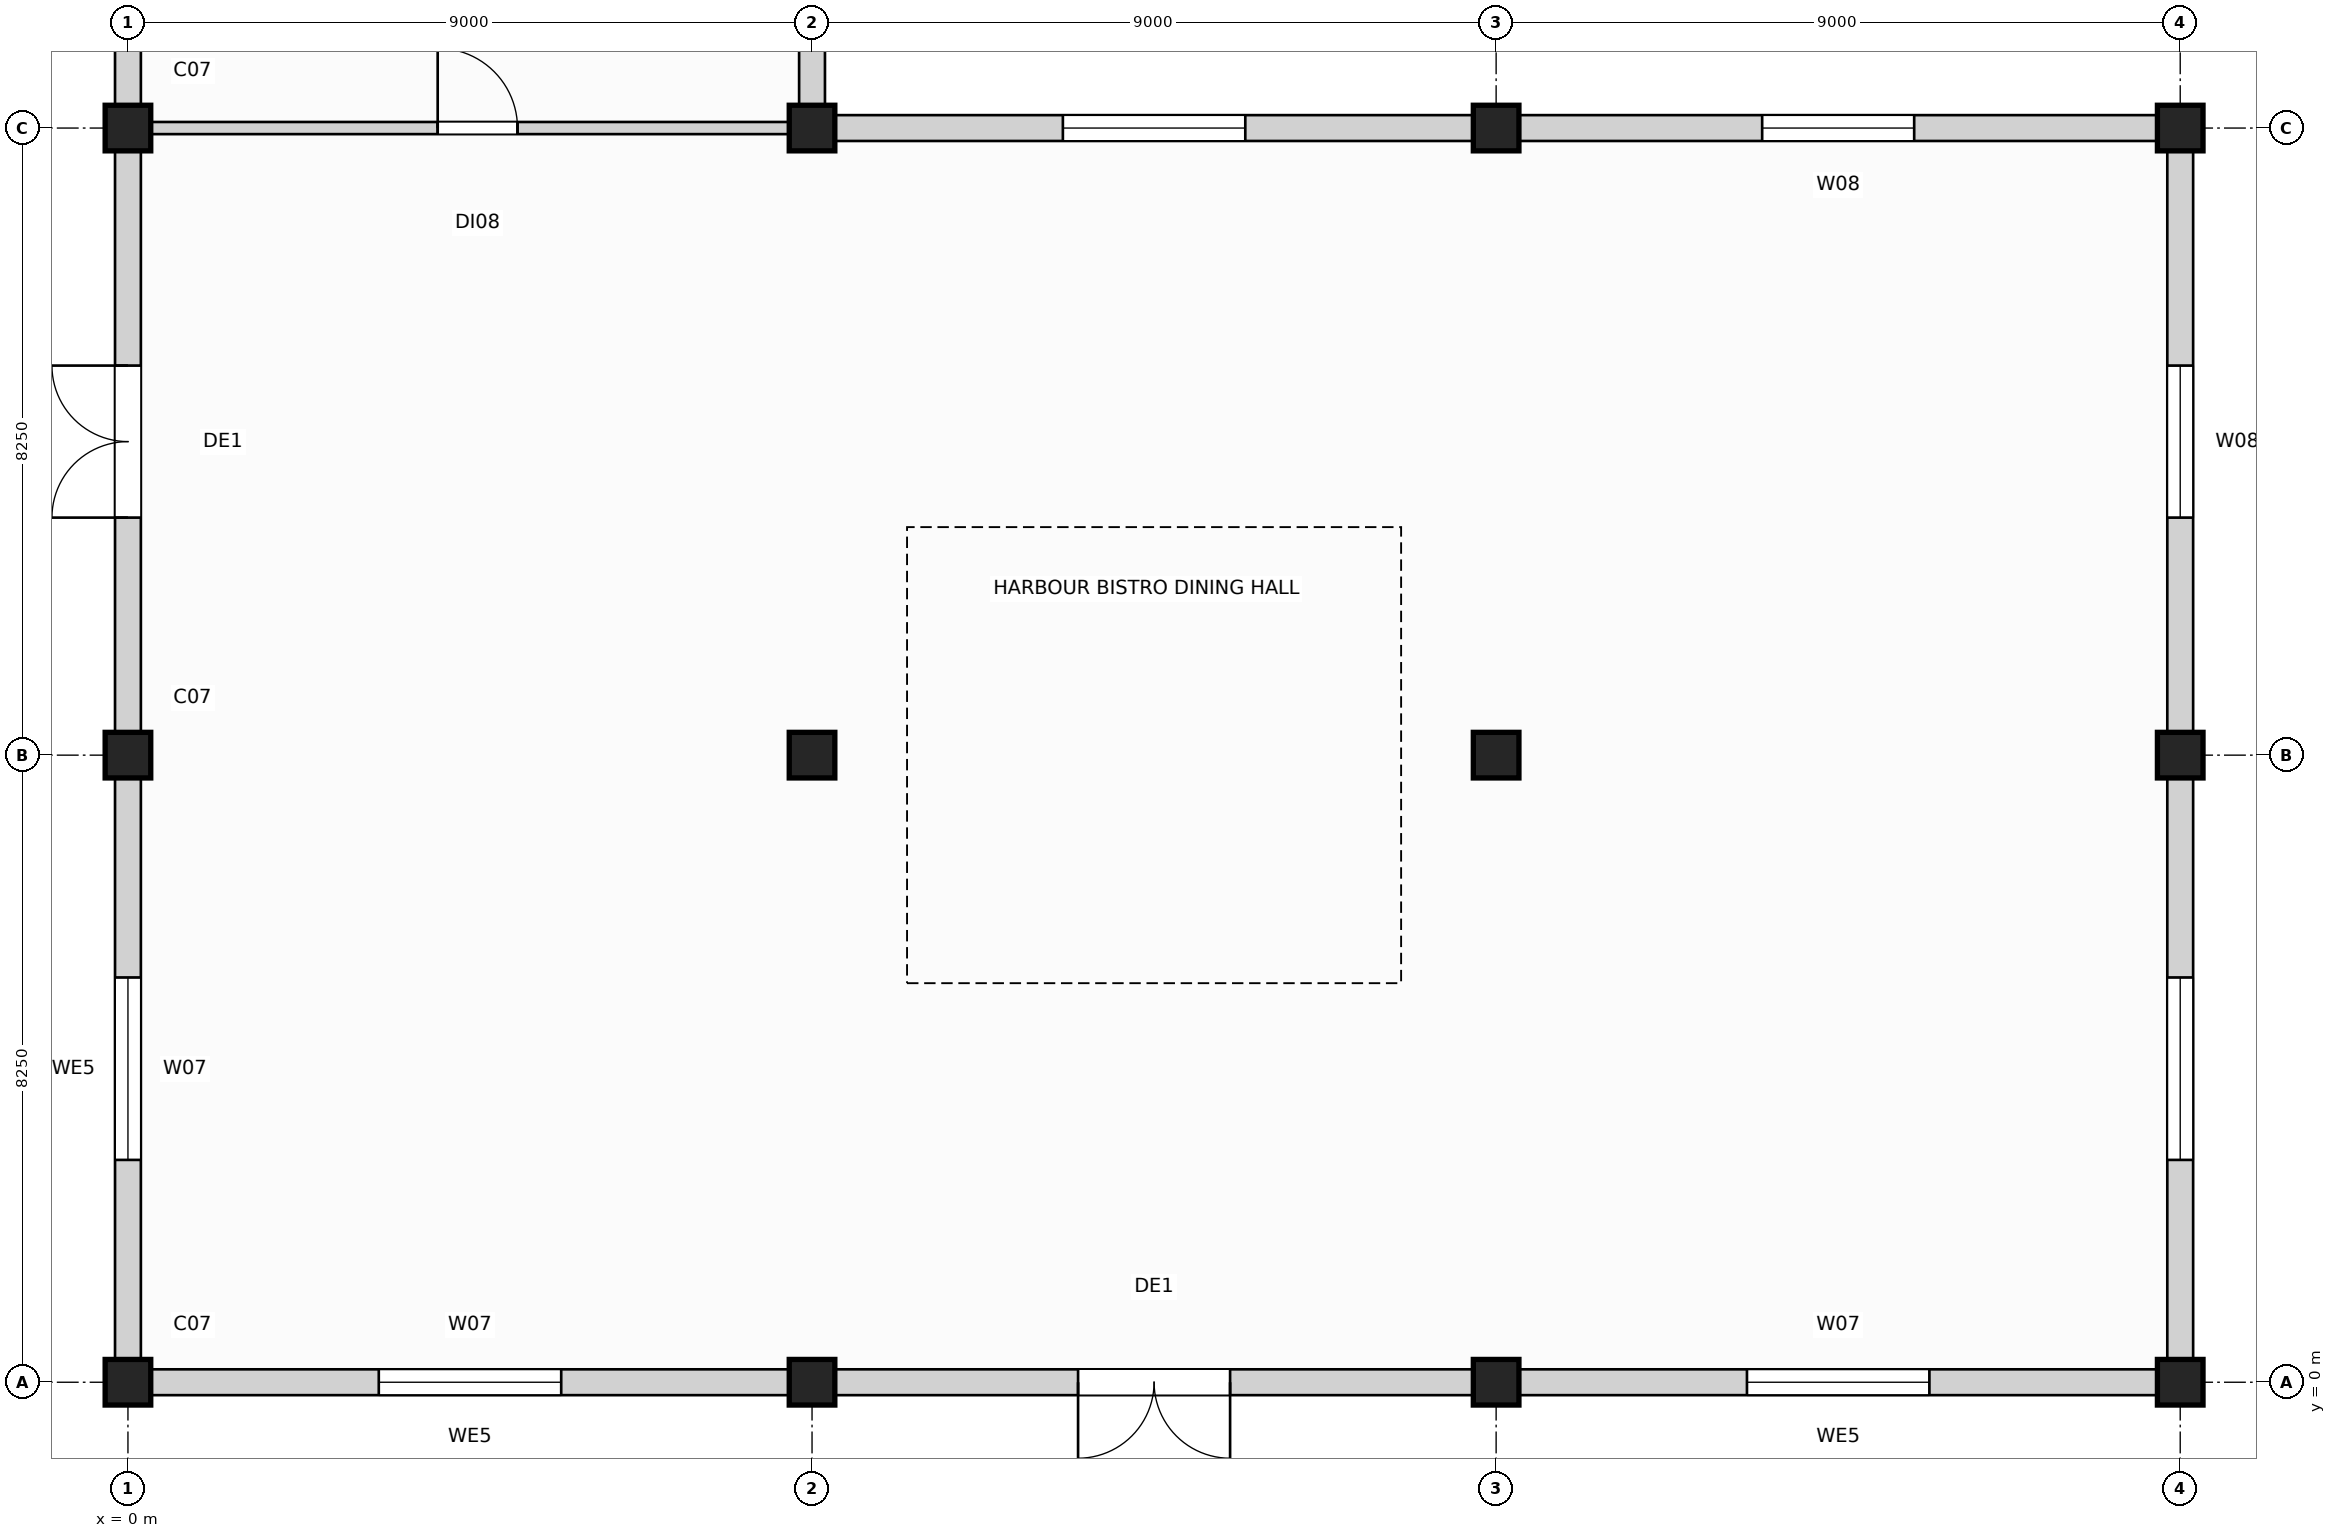
"""IFC4 building model, lengths in metres.
Left out: names, types, materials, properties, quantities, classifications, styles, units other than length and angle.
Written with IfcOpenShell. Run it as: python <this file> out.ifc"""

import sys

from ifc_helpers import new_model, si_unit, direction, frame, frame_2d, origin, origin_2d, place, context, subcontext, project, spatial, rectangle, extrude, element, fill, save


model = new_model("IFC4")
c1 = context("Model", 3, precision=1e-05, world=origin(), true_north=direction((0.0, 1.0)))
c2 = subcontext(c1, "Body", "Model", "MODEL_VIEW")
j1 = project(units=[si_unit("LENGTHUNIT", "METRE"), si_unit("PLANEANGLEUNIT", "RADIAN")], contexts=[c1])
p1 = place(None, origin())
s1 = spatial("IfcSite", under=j1, at=p1, CompositionType="ELEMENT")
p2 = place(p1, origin())
s2 = spatial("IfcBuilding", under=s1, at=p2, CompositionType="ELEMENT")
p3 = place(p2, origin())
s3 = spatial("IfcBuildingStorey", under=s2, at=p3, CompositionType="ELEMENT", Elevation=0.0)
for number, where, z_axis, x_axis in (
    (1, (0.0, 0.0, 0.0), (0.0, 0.0, 1.0), (1.0, 0.0, 0.0)),
    (2, (0.0, 8.25, 0.0), (0.0, 0.0, 1.0), (1.0, 0.0, 0.0)),
    (3, (0.0, 16.5, 0.0), (0.0, 0.0, 1.0), (1.0, 0.0, 0.0)),
    (4, (9.0, 0.0, 0.0), (0.0, 0.0, 1.0), (1.0, 0.0, 0.0)),
    (5, (9.0, 8.25, 0.0), (0.0, 0.0, 1.0), (1.0, 0.0, 0.0)),
    (6, (9.0, 16.5, 0.0), (0.0, 0.0, 1.0), (1.0, 0.0, 0.0)),
    (7, (18.0, 0.0, 0.0), (0.0, 0.0, 1.0), (1.0, 0.0, 0.0)),
    (8, (18.0, 8.25, 0.0), (0.0, 0.0, 1.0), (1.0, 0.0, 0.0)),
    (9, (18.0, 16.5, 0.0), (0.0, 0.0, 1.0), (1.0, 0.0, 0.0)),
    (10, (27.0, 0.0, 0.0), (0.0, 0.0, 1.0), (1.0, 0.0, 0.0)),
    (11, (27.0, 8.25, 0.0), (0.0, 0.0, 1.0), (1.0, 0.0, 0.0)),
    (12, (27.0, 16.5, 0.0), (0.0, 0.0, 1.0), (1.0, 0.0, 0.0)),
):
    element("IfcColumn", number, at=place(p3, frame(where, z_axis=z_axis, x_axis=x_axis)), inside=s3, PredefinedType="COLUMN", context=c2, shape_type="SweptSolid", body=[
        extrude(rectangle(XDim=0.6, YDim=0.6, at=origin_2d()), origin(), (0.0, 0.0, 1.0), 6.0),
    ])
p4 = place(p3, frame((8.705, 0.0, 0.0), z_axis=(0.0, 0.0, 1.0), x_axis=(-1.0, 0.0, 0.0)))
e13 = element("IfcWall", 13, at=p4, inside=s3, PredefinedType="SOLIDWALL", context=c2, shape_type="SweptSolid", body=[
    extrude(rectangle(XDim=8.41, YDim=0.34, at=frame_2d((4.205, 0.0))), origin(), (0.0, 0.0, 1.0), 4.965),
])
p5 = place(p4, frame((3.005, 0.0, 0.85)))
e14 = element("IfcOpeningElement", 14, at=p5, cuts=e13, PredefinedType="OPENING", context=c2, shape_type="SweptSolid", body=[
    extrude(rectangle(XDim=2.4, YDim=2.7, at=frame_2d((1.2, 1.35))), frame((0.0, 0.18, 0.0), z_axis=(0.0, -1.0, 0.0), x_axis=(1.0, 0.0, 0.0)), (0.0, 0.0, 1.0), 0.36),
])
p6 = place(p3, frame((17.705, 0.0, 0.0), z_axis=(0.0, 0.0, 1.0), x_axis=(-1.0, 0.0, 0.0)))
e15 = element("IfcWall", 15, at=p6, inside=s3, PredefinedType="SOLIDWALL", context=c2, shape_type="SweptSolid", body=[
    extrude(rectangle(XDim=8.41, YDim=0.34, at=frame_2d((4.205, 0.0))), origin(), (0.0, 0.0, 1.0), 4.965),
])
p7 = place(p6, frame((3.205, 0.0, 0.0)))
e16 = element("IfcOpeningElement", 16, at=p7, cuts=e15, PredefinedType="OPENING", context=c2, shape_type="SweptSolid", body=[
    extrude(rectangle(XDim=2.0, YDim=2.4, at=frame_2d((1.0, 1.2))), frame((0.0, 0.18, 0.0), z_axis=(0.0, -1.0, 0.0), x_axis=(1.0, 0.0, 0.0)), (0.0, 0.0, 1.0), 0.36),
])
p8 = place(p3, frame((26.705, 0.0, 0.0), z_axis=(0.0, 0.0, 1.0), x_axis=(-1.0, 0.0, 0.0)))
e17 = element("IfcWall", 17, at=p8, inside=s3, PredefinedType="SOLIDWALL", context=c2, shape_type="SweptSolid", body=[
    extrude(rectangle(XDim=8.41, YDim=0.34, at=frame_2d((4.205, 0.0))), origin(), (0.0, 0.0, 1.0), 4.965),
])
p9 = place(p8, frame((3.005, 0.0, 0.85)))
e18 = element("IfcOpeningElement", 18, at=p9, cuts=e17, PredefinedType="OPENING", context=c2, shape_type="SweptSolid", body=[
    extrude(rectangle(XDim=2.4, YDim=2.7, at=frame_2d((1.2, 1.35))), frame((0.0, 0.18, 0.0), z_axis=(0.0, -1.0, 0.0), x_axis=(1.0, 0.0, 0.0)), (0.0, 0.0, 1.0), 0.36),
])
p10 = place(p3, frame((0.0, 0.295, 0.0), z_axis=(0.0, 0.0, 1.0), x_axis=(0.0, 1.0, 0.0)))
e19 = element("IfcWall", 19, at=p10, inside=s3, PredefinedType="SOLIDWALL", context=c2, shape_type="SweptSolid", body=[
    extrude(rectangle(XDim=7.66, YDim=0.34, at=frame_2d((3.83, 0.0))), origin(), (0.0, 0.0, 1.0), 4.715),
])
p11 = place(p10, frame((2.63, 0.0, 0.85)))
e20 = element("IfcOpeningElement", 20, at=p11, cuts=e19, PredefinedType="OPENING", context=c2, shape_type="SweptSolid", body=[
    extrude(rectangle(XDim=2.4, YDim=2.7, at=frame_2d((1.2, 1.35))), frame((0.0, 0.18, 0.0), z_axis=(0.0, -1.0, 0.0), x_axis=(1.0, 0.0, 0.0)), (0.0, 0.0, 1.0), 0.36),
])
p12 = place(p3, frame((0.0, 8.545, 0.0), z_axis=(0.0, 0.0, 1.0), x_axis=(0.0, 1.0, 0.0)))
e21 = element("IfcWall", 21, at=p12, inside=s3, PredefinedType="SOLIDWALL", context=c2, shape_type="SweptSolid", body=[
    extrude(rectangle(XDim=7.66, YDim=0.34, at=frame_2d((3.83, 0.0))), origin(), (0.0, 0.0, 1.0), 4.715),
])
p13 = place(p12, frame((2.83, 0.0, 0.0)))
e22 = element("IfcOpeningElement", 22, at=p13, cuts=e21, PredefinedType="OPENING", context=c2, shape_type="SweptSolid", body=[
    extrude(rectangle(XDim=2.0, YDim=2.4, at=frame_2d((1.0, 1.2))), frame((0.0, 0.18, 0.0), z_axis=(0.0, -1.0, 0.0), x_axis=(1.0, 0.0, 0.0)), (0.0, 0.0, 1.0), 0.36),
])
p14 = place(p3, frame((0.0, 16.795, 0.0), z_axis=(0.0, 0.0, 1.0), x_axis=(0.0, 1.0, 0.0)))
e23 = element("IfcWall", 23, at=p14, inside=s3, PredefinedType="SOLIDWALL", context=c2, shape_type="SweptSolid", body=[
    extrude(rectangle(XDim=7.66, YDim=0.34, at=frame_2d((3.83, 0.0))), origin(), (0.0, 0.0, 1.0), 4.715),
])
p15 = place(p14, frame((2.63, 0.0, 0.85)))
e24 = element("IfcOpeningElement", 24, at=p15, cuts=e23, PredefinedType="OPENING", context=c2, shape_type="SweptSolid", body=[
    extrude(rectangle(XDim=2.4, YDim=2.7, at=frame_2d((1.2, 1.35))), frame((0.0, 0.18, 0.0), z_axis=(0.0, -1.0, 0.0), x_axis=(1.0, 0.0, 0.0)), (0.0, 0.0, 1.0), 0.36),
])
p16 = place(p3, frame((27.0, 0.295, 0.0), z_axis=(0.0, 0.0, 1.0), x_axis=(0.0, 1.0, 0.0)))
e25 = element("IfcWall", 25, at=p16, inside=s3, PredefinedType="SOLIDWALL", context=c2, shape_type="SweptSolid", body=[
    extrude(rectangle(XDim=7.66, YDim=0.34, at=frame_2d((3.83, 0.0))), origin(), (0.0, 0.0, 1.0), 5.015),
])
p17 = place(p16, frame((2.63, 0.0, 0.85)))
e26 = element("IfcOpeningElement", 26, at=p17, cuts=e25, PredefinedType="OPENING", context=c2, shape_type="SweptSolid", body=[
    extrude(rectangle(XDim=2.4, YDim=2.7, at=frame_2d((1.2, 1.35))), frame((0.0, 0.18, 0.0), z_axis=(0.0, -1.0, 0.0), x_axis=(1.0, 0.0, 0.0)), (0.0, 0.0, 1.0), 0.36),
])
p18 = place(p3, frame((27.0, 8.545, 0.0), z_axis=(0.0, 0.0, 1.0), x_axis=(0.0, 1.0, 0.0)))
e27 = element("IfcWall", 27, at=p18, inside=s3, PredefinedType="SOLIDWALL", context=c2, shape_type="SweptSolid", body=[
    extrude(rectangle(XDim=7.66, YDim=0.34, at=frame_2d((3.83, 0.0))), origin(), (0.0, 0.0, 1.0), 5.115),
])
p19 = place(p18, frame((2.83, 0.0, 0.85)))
e28 = element("IfcOpeningElement", 28, at=p19, cuts=e27, PredefinedType="OPENING", context=c2, shape_type="SweptSolid", body=[
    extrude(rectangle(XDim=2.0, YDim=2.4, at=frame_2d((1.0, 1.2))), frame((0.0, 0.18, 0.0), z_axis=(0.0, -1.0, 0.0), x_axis=(1.0, 0.0, 0.0)), (0.0, 0.0, 1.0), 0.36),
])
p20 = place(p3, frame((9.295, 16.5, 0.0), z_axis=(0.0, 0.0, 1.0), x_axis=(1.0, 0.0, 0.0)))
e29 = element("IfcWall", 29, at=p20, inside=s3, PredefinedType="SOLIDWALL", context=c2, shape_type="SweptSolid", body=[
    extrude(rectangle(XDim=8.41, YDim=0.34, at=frame_2d((4.205, 0.0))), origin(), (0.0, 0.0, 1.0), 5.015),
])
p21 = place(p20, frame((3.005, 0.0, 0.85)))
e30 = element("IfcOpeningElement", 30, at=p21, cuts=e29, PredefinedType="OPENING", context=c2, shape_type="SweptSolid", body=[
    extrude(rectangle(XDim=2.4, YDim=2.7, at=frame_2d((1.2, 1.35))), frame((0.0, 0.18, 0.0), z_axis=(0.0, -1.0, 0.0), x_axis=(1.0, 0.0, 0.0)), (0.0, 0.0, 1.0), 0.36),
])
p22 = place(p3, frame((18.295, 16.5, 0.0), z_axis=(0.0, 0.0, 1.0), x_axis=(1.0, 0.0, 0.0)))
e31 = element("IfcWall", 31, at=p22, inside=s3, PredefinedType="SOLIDWALL", context=c2, shape_type="SweptSolid", body=[
    extrude(rectangle(XDim=8.41, YDim=0.34, at=frame_2d((4.205, 0.0))), origin(), (0.0, 0.0, 1.0), 5.015),
])
p23 = place(p22, frame((3.205, 0.0, 0.85)))
e32 = element("IfcOpeningElement", 32, at=p23, cuts=e31, PredefinedType="OPENING", context=c2, shape_type="SweptSolid", body=[
    extrude(rectangle(XDim=2.0, YDim=2.4, at=frame_2d((1.0, 1.2))), frame((0.0, 0.18, 0.0), z_axis=(0.0, -1.0, 0.0), x_axis=(1.0, 0.0, 0.0)), (0.0, 0.0, 1.0), 0.36),
])
p24 = place(p3, frame((9.0, 16.795, 0.0), z_axis=(0.0, 0.0, 1.0), x_axis=(0.0, 1.0, 0.0)))
e33 = element("IfcWall", 33, at=p24, inside=s3, PredefinedType="SOLIDWALL", context=c2, shape_type="SweptSolid", body=[
    extrude(rectangle(XDim=7.66, YDim=0.34, at=frame_2d((3.83, 0.0))), origin(), (0.0, 0.0, 1.0), 5.015),
])
p25 = place(p24, frame((2.63, 0.0, 0.85)))
e34 = element("IfcOpeningElement", 34, at=p25, cuts=e33, PredefinedType="OPENING", context=c2, shape_type="SweptSolid", body=[
    extrude(rectangle(XDim=2.4, YDim=2.7, at=frame_2d((1.2, 1.35))), frame((0.0, 0.18, 0.0), z_axis=(0.0, -1.0, 0.0), x_axis=(1.0, 0.0, 0.0)), (0.0, 0.0, 1.0), 0.36),
])
p26 = place(p3, frame((0.2, 16.5, 0.0), z_axis=(0.0, 0.0, 1.0), x_axis=(1.0, 0.0, 0.0)))
e35 = element("IfcWall", 35, at=p26, inside=s3, PredefinedType="PARTITIONING", context=c2, shape_type="SweptSolid", body=[
    extrude(rectangle(XDim=8.8, YDim=0.16, at=frame_2d((4.4, 0.0))), origin(), (0.0, 0.0, 1.0), 4.715),
])
p27 = place(p26, frame((3.875, 0.0, 0.0)))
e36 = element("IfcOpeningElement", 36, at=p27, cuts=e35, PredefinedType="OPENING", context=c2, shape_type="SweptSolid", body=[
    extrude(rectangle(XDim=1.05, YDim=2.12, at=frame_2d((0.525, 1.06))), frame((0.0, 0.09, 0.0), z_axis=(0.0, -1.0, 0.0), x_axis=(1.0, 0.0, 0.0)), (0.0, 0.0, 1.0), 0.18),
])
p28 = place(p5, origin())
e37 = element("IfcWindow", 37, at=p28, inside=s3, PartitioningType="SINGLE_PANEL", PredefinedType="WINDOW", context=c2, shape_type="SweptSolid", body=[
    extrude(rectangle(XDim=2.4, YDim=2.7, at=frame_2d((1.2, 1.35))), frame((0.0, 0.03, 0.0), z_axis=(0.0, -1.0, 0.0), x_axis=(1.0, 0.0, 0.0)), (0.0, 0.0, 1.0), 0.06),
])
fill(e14, e37)
p29 = place(p9, origin())
e38 = element("IfcWindow", 38, at=p29, inside=s3, PartitioningType="SINGLE_PANEL", PredefinedType="WINDOW", context=c2, shape_type="SweptSolid", body=[
    extrude(rectangle(XDim=2.4, YDim=2.7, at=frame_2d((1.2, 1.35))), frame((0.0, 0.03, 0.0), z_axis=(0.0, -1.0, 0.0), x_axis=(1.0, 0.0, 0.0)), (0.0, 0.0, 1.0), 0.06),
])
fill(e18, e38)
p30 = place(p11, origin())
e39 = element("IfcWindow", 39, at=p30, inside=s3, PartitioningType="SINGLE_PANEL", PredefinedType="WINDOW", context=c2, shape_type="SweptSolid", body=[
    extrude(rectangle(XDim=2.4, YDim=2.7, at=frame_2d((1.2, 1.35))), frame((0.0, 0.03, 0.0), z_axis=(0.0, -1.0, 0.0), x_axis=(1.0, 0.0, 0.0)), (0.0, 0.0, 1.0), 0.06),
])
fill(e20, e39)
p31 = place(p17, origin())
e40 = element("IfcWindow", 40, at=p31, inside=s3, PartitioningType="SINGLE_PANEL", PredefinedType="WINDOW", context=c2, shape_type="SweptSolid", body=[
    extrude(rectangle(XDim=2.4, YDim=2.7, at=frame_2d((1.2, 1.35))), frame((0.0, 0.03, 0.0), z_axis=(0.0, -1.0, 0.0), x_axis=(1.0, 0.0, 0.0)), (0.0, 0.0, 1.0), 0.06),
])
fill(e26, e40)
p32 = place(p19, origin())
e41 = element("IfcWindow", 41, at=p32, inside=s3, PartitioningType="SINGLE_PANEL", PredefinedType="WINDOW", context=c2, shape_type="SweptSolid", body=[
    extrude(rectangle(XDim=2.0, YDim=2.4, at=frame_2d((1.0, 1.2))), frame((0.0, 0.03, 0.0), z_axis=(0.0, -1.0, 0.0), x_axis=(1.0, 0.0, 0.0)), (0.0, 0.0, 1.0), 0.06),
])
fill(e28, e41)
p33 = place(p21, origin())
e42 = element("IfcWindow", 42, at=p33, inside=s3, PartitioningType="SINGLE_PANEL", PredefinedType="WINDOW", context=c2, shape_type="SweptSolid", body=[
    extrude(rectangle(XDim=2.4, YDim=2.7, at=frame_2d((1.2, 1.35))), frame((0.0, 0.03, 0.0), z_axis=(0.0, -1.0, 0.0), x_axis=(1.0, 0.0, 0.0)), (0.0, 0.0, 1.0), 0.06),
])
fill(e30, e42)
p34 = place(p23, origin())
e43 = element("IfcWindow", 43, at=p34, inside=s3, PartitioningType="SINGLE_PANEL", PredefinedType="WINDOW", context=c2, shape_type="SweptSolid", body=[
    extrude(rectangle(XDim=2.0, YDim=2.4, at=frame_2d((1.0, 1.2))), frame((0.0, 0.03, 0.0), z_axis=(0.0, -1.0, 0.0), x_axis=(1.0, 0.0, 0.0)), (0.0, 0.0, 1.0), 0.06),
])
fill(e32, e43)
p35 = place(p7, origin())
e44 = element("IfcDoor", 44, at=p35, inside=s3, OperationType="DOUBLE_DOOR_SINGLE_SWING", PredefinedType="DOOR", context=c2, shape_type="SweptSolid", body=[
    extrude(rectangle(XDim=2.0, YDim=2.4, at=frame_2d((1.0, 1.2))), frame((0.0, 0.025, 0.0), z_axis=(0.0, -1.0, 0.0), x_axis=(1.0, 0.0, 0.0)), (0.0, 0.0, 1.0), 0.05),
])
fill(e16, e44)
p36 = place(p13, origin())
e45 = element("IfcDoor", 45, at=p36, inside=s3, OperationType="DOUBLE_DOOR_SINGLE_SWING", PredefinedType="DOOR", context=c2, shape_type="SweptSolid", body=[
    extrude(rectangle(XDim=2.0, YDim=2.4, at=frame_2d((1.0, 1.2))), frame((0.0, 0.025, 0.0), z_axis=(0.0, -1.0, 0.0), x_axis=(1.0, 0.0, 0.0)), (0.0, 0.0, 1.0), 0.05),
])
fill(e22, e45)
p37 = place(p27, origin())
e46 = element("IfcDoor", 46, at=p37, inside=s3, OperationType="SINGLE_SWING_LEFT", PredefinedType="DOOR", context=c2, shape_type="SweptSolid", body=[
    extrude(rectangle(XDim=1.05, YDim=2.12, at=frame_2d((0.525, 1.06))), frame((0.0, 0.025, 0.0), z_axis=(0.0, -1.0, 0.0), x_axis=(1.0, 0.0, 0.0)), (0.0, 0.0, 1.0), 0.05),
])
fill(e36, e46)
save(model, sys.argv[1])
